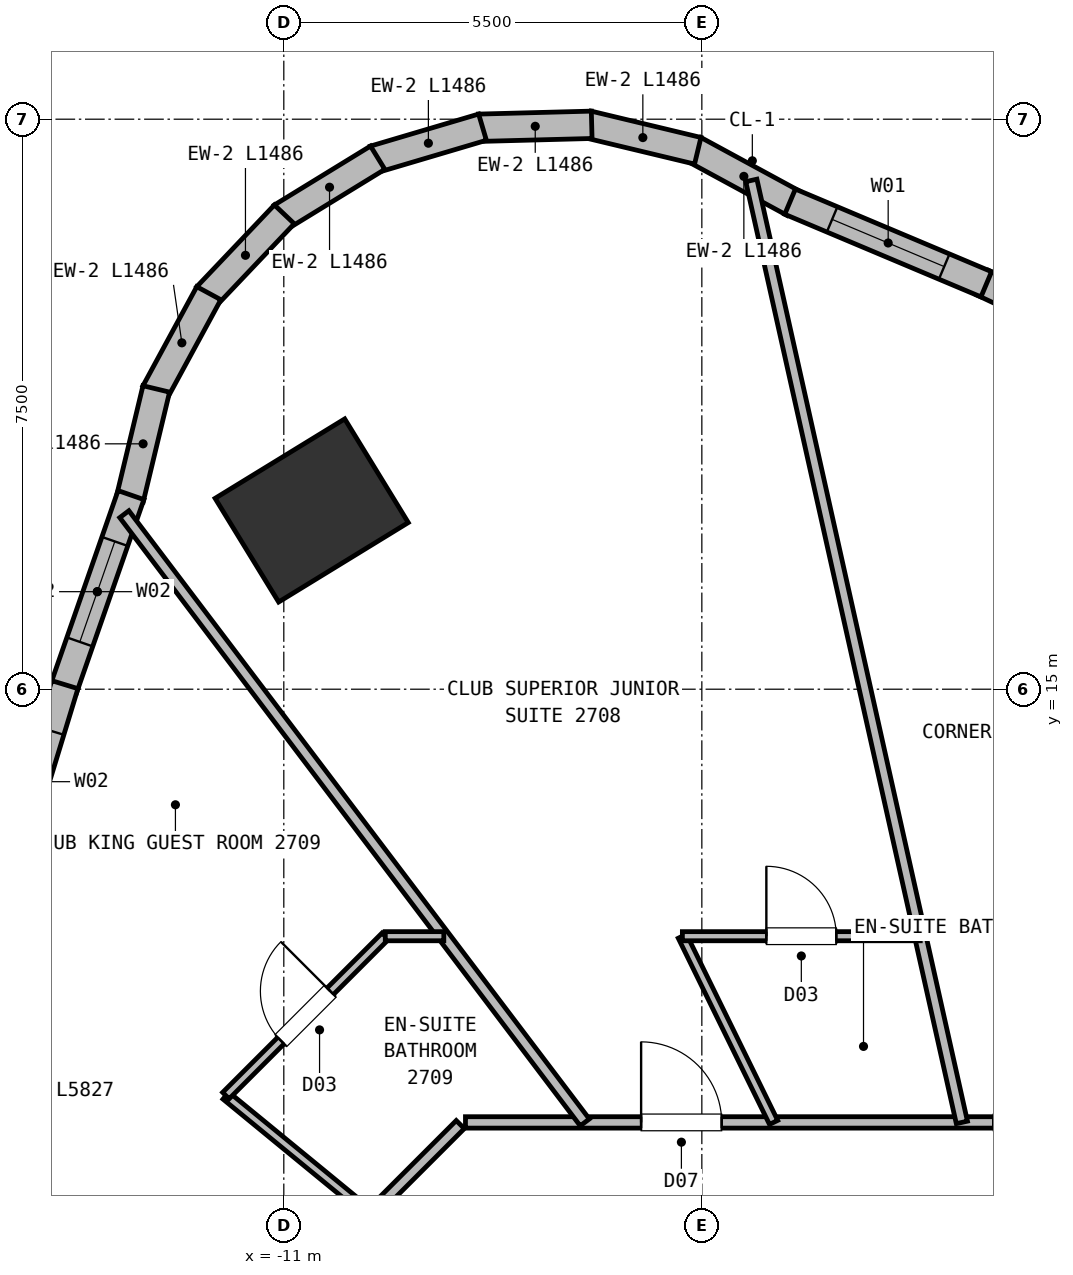
"""IFC4 building model, lengths in metres.
Left out: names, types, materials, properties, quantities, classifications, styles, units other than length and angle.
Written with IfcOpenShell. Run it as: python <this file> out.ifc"""

import sys

from ifc_helpers import new_model, si_unit, direction, frame, frame_2d, origin, origin_2d, place, context, subcontext, project, spatial, rectangle, extrude, element, fill, save


model = new_model("IFC4")
c1 = context("Model", 3, precision=1e-05, world=origin(), true_north=direction((0.0, 1.0)))
c2 = subcontext(c1, "Body", "Model", "MODEL_VIEW")
j1 = project(units=[si_unit("LENGTHUNIT", "METRE"), si_unit("PLANEANGLEUNIT", "RADIAN")], contexts=[c1])
p1 = place(None, origin())
s1 = spatial("IfcSite", under=j1, at=p1, CompositionType="ELEMENT")
p2 = place(p1, origin())
s2 = spatial("IfcBuilding", under=s1, at=p2, CompositionType="ELEMENT")
p3 = place(p2, frame((0.0, 0.0, 101.0)))
s3 = spatial("IfcBuildingStorey", under=s2, at=p3, CompositionType="ELEMENT", Elevation=101.0)
p4 = place(p3, frame((-10.633, 17.352, 0.0), z_axis=(0.0, 0.0, 1.0), x_axis=(-0.522498564716, 0.852640164354, 0.0)))
e1 = element("IfcColumn", 1, at=p4, inside=s3, PredefinedType="COLUMN", context=c2, shape_type="SweptSolid", body=[
    extrude(rectangle(XDim=1.6, YDim=2.0, at=origin_2d()), origin(), (0.0, 0.0, 1.0), 3.75),
])
for number, where, z_axis, x_axis in (
    (2, (-5.6, 22.102, 0.0), (0.0, 0.0, 1.0), (0.879, -0.477, 0.0)),
    (3, (-6.999, 22.431, 0.0), (0.0, 0.0, 1.0), (0.972, -0.233, 0.0)),
    (4, (-8.435, 22.387, 0.0), (0.0, 0.0, 1.0), (1.0, 0.026, 0.0)),
    (5, (-9.81, 21.973, 0.0), (0.0, 0.0, 1.0), (0.959, 0.284, 0.0)),
    (6, (-11.032, 21.217, 0.0), (0.0, 0.0, 1.0), (0.853, 0.523, 0.0)),
    (7, (-12.016, 20.17, 0.0), (0.0, 0.0, 1.0), (0.688, 0.725, 0.0)),
    (8, (-12.696, 18.905, 0.0), (0.0, 0.0, 1.0), (0.477, 0.879, 0.0)),
):
    element("IfcWall", number, at=place(p3, frame(where, z_axis=z_axis, x_axis=x_axis)), inside=s3, PredefinedType="SOLIDWALL", context=c2, shape_type="SweptSolid", body=[
        extrude(rectangle(XDim=1.486, YDim=0.36, at=frame_2d((0.743, 0.0))), origin(), (0.0, 0.0, 1.0), 3.5),
    ])
p5 = place(p3, frame((-13.025, 17.506, 0.0), z_axis=(0.0, 0.0, 1.0), x_axis=(0.23351590147, 0.972352983109, 0.0)))
e9 = element("IfcWall", 9, at=p5, inside=s3, PredefinedType="SOLIDWALL", context=c2, shape_type="SweptSolid", body=[
    extrude(rectangle(XDim=1.486, YDim=0.36, at=frame_2d((0.743, 0.0))), origin(), (0.0, 0.0, 1.0), 3.5),
])
p6 = place(p3, frame((-13.896, 15.012, 0.0), z_axis=(0.0, 0.0, 1.0), x_axis=(0.328988489893, 0.944333931148, 0.0)))
e10 = element("IfcWall", 10, at=p6, inside=s3, PredefinedType="SOLIDWALL", context=c2, shape_type="SweptSolid", body=[
    extrude(rectangle(XDim=2.692, YDim=0.36, at=frame_2d((1.346, 0.0))), origin(), (0.0, 0.0, 1.0), 3.5),
])
p7 = place(p6, frame((0.646, 0.0, 0.72)))
e11 = element("IfcOpeningElement", 11, at=p7, cuts=e10, PredefinedType="OPENING", context=c2, shape_type="SweptSolid", body=[
    extrude(rectangle(XDim=1.4, YDim=1.84, at=frame_2d((0.7, 0.92))), frame((0.0, 0.19, 0.0), z_axis=(0.0, -1.0, 0.0), x_axis=(1.0, 0.0, 0.0)), (0.0, 0.0, 1.0), 0.38),
])
p8 = place(p3, frame((-14.66, 12.507, 0.0), z_axis=(0.0, 0.0, 1.0), x_axis=(0.291842096338, 0.956466513164, 0.0)))
e12 = element("IfcWall", 12, at=p8, inside=s3, PredefinedType="SOLIDWALL", context=c2, shape_type="SweptSolid", body=[
    extrude(rectangle(XDim=2.669, YDim=0.36, at=frame_2d((1.335, 0.0))), origin(), (0.0, 0.0, 1.0), 3.5),
])
p9 = place(p8, frame((0.635, 0.0, 0.72)))
e13 = element("IfcOpeningElement", 13, at=p9, cuts=e12, PredefinedType="OPENING", context=c2, shape_type="SweptSolid", body=[
    extrude(rectangle(XDim=1.4, YDim=1.84, at=frame_2d((0.7, 0.92))), frame((0.0, 0.19, 0.0), z_axis=(0.0, -1.0, 0.0), x_axis=(1.0, 0.0, 0.0)), (0.0, 0.0, 1.0), 0.38),
])
p10 = place(p3, frame((-1.803, 20.348, 0.0), z_axis=(0.0, 0.0, 1.0), x_axis=(0.905061598697, -0.425280498688, 0.0)))
e14 = element("IfcWall", 14, at=p10, inside=s3, PredefinedType="SOLIDWALL", context=c2, shape_type="SweptSolid", body=[
    extrude(rectangle(XDim=2.777, YDim=0.36, at=frame_2d((1.389, 0.0))), origin(), (0.0, 0.0, 1.0), 3.5),
])
p11 = place(p10, frame((0.589, 0.0, 0.72)))
e15 = element("IfcOpeningElement", 15, at=p11, cuts=e14, PredefinedType="OPENING", context=c2, shape_type="SweptSolid", body=[
    extrude(rectangle(XDim=1.6, YDim=1.88, at=frame_2d((0.8, 0.94))), frame((0.0, 0.19, 0.0), z_axis=(0.0, -1.0, 0.0), x_axis=(1.0, 0.0, 0.0)), (0.0, 0.0, 1.0), 0.38),
])
p12 = place(p3, frame((-4.339, 21.415, 0.0), z_axis=(0.0, 0.0, 1.0), x_axis=(0.921579586259, -0.388189472025, 0.0)))
e16 = element("IfcWall", 16, at=p12, inside=s3, PredefinedType="SOLIDWALL", context=c2, shape_type="SweptSolid", body=[
    extrude(rectangle(XDim=2.801, YDim=0.36, at=frame_2d((1.401, 0.0))), origin(), (0.0, 0.0, 1.0), 3.5),
])
p13 = place(p12, frame((0.601, 0.0, 0.72)))
e17 = element("IfcOpeningElement", 17, at=p13, cuts=e16, PredefinedType="OPENING", context=c2, shape_type="SweptSolid", body=[
    extrude(rectangle(XDim=1.6, YDim=1.88, at=frame_2d((0.8, 0.94))), frame((0.0, 0.19, 0.0), z_axis=(0.0, -1.0, 0.0), x_axis=(1.0, 0.0, 0.0)), (0.0, 0.0, 1.0), 0.38),
])
p14 = place(p3, frame((-8.61, 9.3, 0.0), z_axis=(0.0, 0.0, 1.0), x_axis=(1.0, 0.0, 0.0)))
e18 = element("IfcWall", 18, at=p14, inside=s3, PredefinedType="PARTITIONING", context=c2, shape_type="SweptSolid", body=[
    extrude(rectangle(XDim=17.22, YDim=0.15, at=frame_2d((8.61, 0.0))), origin(), (0.0, 0.0, 1.0), 3.5),
])
p15 = place(p14, frame((11.167, 0.0, 0.0)))
e19 = element("IfcOpeningElement", 19, at=p15, cuts=e18, PredefinedType="OPENING", context=c2, shape_type="SweptSolid", body=[
    extrude(rectangle(XDim=1.0, YDim=2.15, at=frame_2d((0.5, 1.075))), frame((0.0, 0.085, 0.0), z_axis=(0.0, -1.0, 0.0), x_axis=(1.0, 0.0, 0.0)), (0.0, 0.0, 1.0), 0.17),
])
p16 = place(p14, frame((6.944, 0.0, 0.0)))
e20 = element("IfcOpeningElement", 20, at=p16, cuts=e18, PredefinedType="OPENING", context=c2, shape_type="SweptSolid", body=[
    extrude(rectangle(XDim=1.06, YDim=2.15, at=frame_2d((0.53, 1.075))), frame((0.0, 0.085, 0.0), z_axis=(0.0, -1.0, 0.0), x_axis=(1.0, 0.0, 0.0)), (0.0, 0.0, 1.0), 0.17),
])
p17 = place(p14, frame((2.311, 0.0, 0.0)))
e21 = element("IfcOpeningElement", 21, at=p17, cuts=e18, PredefinedType="OPENING", context=c2, shape_type="SweptSolid", body=[
    extrude(rectangle(XDim=1.06, YDim=2.15, at=frame_2d((0.53, 1.075))), frame((0.0, 0.085, 0.0), z_axis=(0.0, -1.0, 0.0), x_axis=(1.0, 0.0, 0.0)), (0.0, 0.0, 1.0), 0.17),
])
p18 = place(p3, frame((-10.722, 7.228, 0.0), z_axis=(0.0, 0.0, 1.0), x_axis=(0.707106781187, 0.707106781187, 0.0)))
e22 = element("IfcWall", 22, at=p18, inside=s3, PredefinedType="PARTITIONING", context=c2, shape_type="SweptSolid", body=[
    extrude(rectangle(XDim=2.89, YDim=0.15, at=frame_2d((1.445, 0.0))), origin(), (0.0, 0.0, 1.0), 3.5),
])
p19 = place(p3, frame((-2.079, 9.3, 0.0), z_axis=(0.0, 0.0, 1.0), x_axis=(-0.218143379007, 0.975916731179, 0.0)))
e23 = element("IfcWall", 23, at=p19, inside=s3, PredefinedType="PARTITIONING", context=c2, shape_type="SweptSolid", body=[
    extrude(rectangle(XDim=12.7, YDim=0.15, at=frame_2d((6.35, 0.0))), origin(), (0.0, 0.0, 1.0), 3.5),
])
p20 = place(p3, frame((-5.756, 11.75, 0.0), z_axis=(0.0, 0.0, 1.0), x_axis=(0.439932257938, -0.898030961841, 0.0)))
e24 = element("IfcWall", 24, at=p20, inside=s3, PredefinedType="PARTITIONING", context=c2, shape_type="SweptSolid", body=[
    extrude(rectangle(XDim=2.728, YDim=0.12, at=frame_2d((1.364, 0.0))), origin(), (0.0, 0.0, 1.0), 3.5),
])
p21 = place(p3, frame((-5.756, 11.75, 0.0), z_axis=(0.0, 0.0, 1.0), x_axis=(1.0, 0.0, 0.0)))
e25 = element("IfcWall", 25, at=p21, inside=s3, PredefinedType="PARTITIONING", context=c2, shape_type="SweptSolid", body=[
    extrude(rectangle(XDim=3.13, YDim=0.12, at=frame_2d((1.565, 0.0))), origin(), (0.0, 0.0, 1.0), 3.5),
])
p22 = place(p21, frame((1.105, 0.0, 0.0)))
e26 = element("IfcOpeningElement", 26, at=p22, cuts=e25, PredefinedType="OPENING", context=c2, shape_type="SweptSolid", body=[
    extrude(rectangle(XDim=0.92, YDim=2.1, at=frame_2d((0.46, 1.05))), frame((0.0, 0.07, 0.0), z_axis=(0.0, -1.0, 0.0), x_axis=(1.0, 0.0, 0.0)), (0.0, 0.0, 1.0), 0.14),
])
p23 = place(p3, frame((-7.04, 9.3, 0.0), z_axis=(0.0, 0.0, 1.0), x_axis=(-0.60357057416, 0.797309577271, 0.0)))
e27 = element("IfcWall", 27, at=p23, inside=s3, PredefinedType="PARTITIONING", context=c2, shape_type="SweptSolid", body=[
    extrude(rectangle(XDim=10.037, YDim=0.15, at=frame_2d((5.019, 0.0))), origin(), (0.0, 0.0, 1.0), 3.5),
])
p24 = place(p3, frame((-11.762, 9.653, 0.0), z_axis=(0.0, 0.0, 1.0), x_axis=(0.773019750399, -0.634381955523, 0.0)))
e28 = element("IfcWall", 28, at=p24, inside=s3, PredefinedType="PARTITIONING", context=c2, shape_type="SweptSolid", body=[
    extrude(rectangle(XDim=2.462, YDim=0.12, at=frame_2d((1.231, 0.0))), origin(), (0.0, 0.0, 1.0), 3.5),
])
p25 = place(p3, frame((-11.762, 9.653, 0.0), z_axis=(0.0, 0.0, 1.0), x_axis=(0.707106781187, 0.707106781187, 0.0)))
e29 = element("IfcWall", 29, at=p25, inside=s3, PredefinedType="PARTITIONING", context=c2, shape_type="SweptSolid", body=[
    extrude(rectangle(XDim=2.966, YDim=0.12, at=frame_2d((1.483, 0.0))), origin(), (0.0, 0.0, 1.0), 3.5),
])
p26 = place(p25, frame((1.023, 0.0, 0.0)))
e30 = element("IfcOpeningElement", 30, at=p26, cuts=e29, PredefinedType="OPENING", context=c2, shape_type="SweptSolid", body=[
    extrude(rectangle(XDim=0.92, YDim=2.1, at=frame_2d((0.46, 1.05))), frame((0.0, 0.07, 0.0), z_axis=(0.0, -1.0, 0.0), x_axis=(1.0, 0.0, 0.0)), (0.0, 0.0, 1.0), 0.14),
])
p27 = place(p3, frame((-8.895, 11.75, 0.0), z_axis=(0.0, 0.0, 1.0), x_axis=(-1.0, 0.0, 0.0)))
e31 = element("IfcWall", 31, at=p27, inside=s3, PredefinedType="PARTITIONING", context=c2, shape_type="SweptSolid", body=[
    extrude(rectangle(XDim=0.77, YDim=0.12, at=frame_2d((0.385, 0.0))), origin(), (0.0, 0.0, 1.0), 3.5),
])
p28 = place(p7, origin())
e32 = element("IfcWindow", 32, at=p28, inside=s3, PartitioningType="SINGLE_PANEL", PredefinedType="WINDOW", context=c2, shape_type="SweptSolid", body=[
    extrude(rectangle(XDim=1.4, YDim=1.84, at=frame_2d((0.7, 0.92))), frame((0.0, 0.03, 0.0), z_axis=(0.0, -1.0, 0.0), x_axis=(1.0, 0.0, 0.0)), (0.0, 0.0, 1.0), 0.06),
])
fill(e11, e32)
p29 = place(p9, origin())
e33 = element("IfcWindow", 33, at=p29, inside=s3, PartitioningType="SINGLE_PANEL", PredefinedType="WINDOW", context=c2, shape_type="SweptSolid", body=[
    extrude(rectangle(XDim=1.4, YDim=1.84, at=frame_2d((0.7, 0.92))), frame((0.0, 0.03, 0.0), z_axis=(0.0, -1.0, 0.0), x_axis=(1.0, 0.0, 0.0)), (0.0, 0.0, 1.0), 0.06),
])
fill(e13, e33)
p30 = place(p13, origin())
e34 = element("IfcWindow", 34, at=p30, inside=s3, PartitioningType="SINGLE_PANEL", PredefinedType="WINDOW", context=c2, shape_type="SweptSolid", body=[
    extrude(rectangle(XDim=1.6, YDim=1.88, at=frame_2d((0.8, 0.94))), frame((0.0, 0.03, 0.0), z_axis=(0.0, -1.0, 0.0), x_axis=(1.0, 0.0, 0.0)), (0.0, 0.0, 1.0), 0.06),
])
fill(e17, e34)
p31 = place(p22, origin())
e35 = element("IfcDoor", 35, at=p31, inside=s3, OperationType="SINGLE_SWING_LEFT", PredefinedType="DOOR", context=c2, shape_type="SweptSolid", body=[
    extrude(rectangle(XDim=0.92, YDim=2.1, at=frame_2d((0.46, 1.05))), frame((0.0, 0.025, 0.0), z_axis=(0.0, -1.0, 0.0), x_axis=(1.0, 0.0, 0.0)), (0.0, 0.0, 1.0), 0.05),
])
fill(e26, e35)
p32 = place(p26, origin())
e36 = element("IfcDoor", 36, at=p32, inside=s3, OperationType="SINGLE_SWING_RIGHT", PredefinedType="DOOR", context=c2, shape_type="SweptSolid", body=[
    extrude(rectangle(XDim=0.92, YDim=2.1, at=frame_2d((0.46, 1.05))), frame((0.0, 0.025, 0.0), z_axis=(0.0, -1.0, 0.0), x_axis=(1.0, 0.0, 0.0)), (0.0, 0.0, 1.0), 0.05),
])
fill(e30, e36)
p33 = place(p17, origin())
e37 = element("IfcDoor", 37, at=p33, inside=s3, OperationType="SINGLE_SWING_LEFT", PredefinedType="DOOR", context=c2, shape_type="SweptSolid", body=[
    extrude(rectangle(XDim=1.06, YDim=2.15, at=frame_2d((0.53, 1.075))), frame((0.0, 0.025, 0.0), z_axis=(0.0, -1.0, 0.0), x_axis=(1.0, 0.0, 0.0)), (0.0, 0.0, 1.0), 0.05),
])
fill(e21, e37)
save(model, sys.argv[1])
